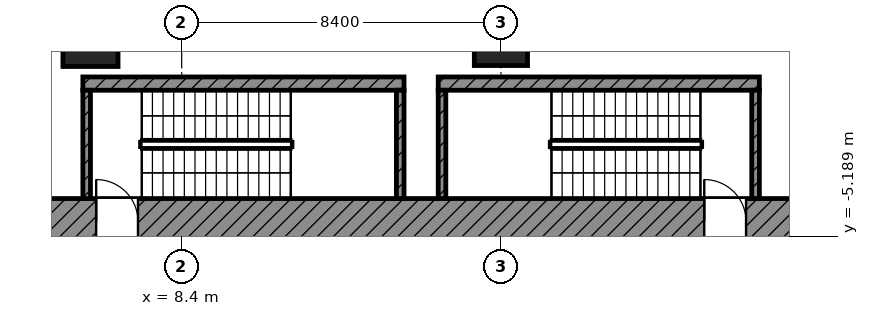
"""IFC4 building model, lengths in metres.
Left out: names, types, materials, properties, quantities, classifications, styles, units other than length and angle.
Written with IfcOpenShell. Run it as: python <this file> out.ifc"""

import sys

from ifc_helpers import new_model, si_unit, direction, frame, frame_2d, origin, origin_2d, place, context, subcontext, project, spatial, rectangle, extrude, element, fill, save


model = new_model("IFC4")
c1 = context("Model", 3, precision=1e-05, world=origin(), true_north=direction((0.0, 1.0)))
c2 = subcontext(c1, "Body", "Model", "MODEL_VIEW")
j1 = project(units=[si_unit("LENGTHUNIT", "METRE"), si_unit("PLANEANGLEUNIT", "RADIAN")], contexts=[c1])
p1 = place(None, origin())
s1 = spatial("IfcSite", under=j1, at=p1, CompositionType="ELEMENT")
p2 = place(p1, origin())
s2 = spatial("IfcBuilding", under=s1, at=p2, CompositionType="ELEMENT")
p3 = place(p2, frame((0.0, 0.0, 23.8)))
s3 = spatial("IfcBuildingStorey", under=s2, at=p3, CompositionType="ELEMENT", Elevation=23.8)
p4 = place(p3, frame((6.0, 0.0, 0.0), z_axis=(0.0, 0.0, 1.0), x_axis=(1.0, 0.0, 0.0)))
e1 = element("IfcColumn", 1, at=p4, inside=s3, PredefinedType="COLUMN", context=c2, shape_type="SweptSolid", body=[
    extrude(rectangle(XDim=1.45, YDim=1.45, at=origin_2d()), origin(), (0.0, 0.0, 1.0), 5.2),
])
p5 = place(p3, frame((16.8, 0.0, 0.0), z_axis=(0.0, 0.0, 1.0), x_axis=(1.0, 0.0, 0.0)))
e2 = element("IfcColumn", 2, at=p5, inside=s3, PredefinedType="COLUMN", context=c2, shape_type="SweptSolid", body=[
    extrude(rectangle(XDim=1.4, YDim=1.4, at=origin_2d()), origin(), (0.0, 0.0, 1.0), 5.2),
])
p6 = place(p3, frame((4.2, -4.8, 0.0), z_axis=(0.0, 0.0, 1.0), x_axis=(1.0, 0.0, 0.0)))
e3 = element("IfcWall", 3, at=p6, inside=s3, PredefinedType="SHEAR", context=c2, shape_type="SweptSolid", body=[
    extrude(rectangle(XDim=21.0, YDim=1.2, at=frame_2d((10.5, 0.0))), origin(), (0.0, 0.0, 1.0), 4.85),
])
p7 = place(p6, frame((1.95, 0.0, 0.0)))
e4 = element("IfcOpeningElement", 4, at=p7, cuts=e3, PredefinedType="OPENING", context=c2, shape_type="SweptSolid", body=[
    extrude(rectangle(XDim=1.1, YDim=2.1, at=frame_2d((0.55, 1.05))), frame((0.0, 0.61, 0.0), z_axis=(0.0, -1.0, 0.0), x_axis=(1.0, 0.0, 0.0)), (0.0, 0.0, 1.0), 1.22),
])
p8 = place(p6, frame((17.95, 0.0, 0.0)))
e5 = element("IfcOpeningElement", 5, at=p8, cuts=e3, PredefinedType="OPENING", context=c2, shape_type="SweptSolid", body=[
    extrude(rectangle(XDim=1.1, YDim=2.1, at=frame_2d((0.55, 1.05))), frame((0.0, 0.61, 0.0), z_axis=(0.0, -1.0, 0.0), x_axis=(1.0, 0.0, 0.0)), (0.0, 0.0, 1.0), 1.22),
])
p9 = place(p3, frame((5.8, -1.175, 0.0), z_axis=(0.0, 0.0, 1.0), x_axis=(1.0, 0.0, 0.0)))
e6 = element("IfcWall", 6, at=p9, inside=s3, PredefinedType="SHEAR", context=c2, shape_type="SweptSolid", body=[
    extrude(rectangle(XDim=8.45, YDim=0.35, at=frame_2d((4.225, 0.0))), origin(), (0.0, 0.0, 1.0), 4.85),
])
for number, where, z_axis, x_axis in (
    (7, (5.9, -4.2, 0.0), (0.0, 0.0, 1.0), (0.0, 1.0, 0.0)),
    (8, (14.15, -4.2, 0.0), (0.0, 0.0, 1.0), (0.0, 1.0, 0.0)),
):
    element("IfcWall", number, at=place(p3, frame(where, z_axis=z_axis, x_axis=x_axis)), inside=s3, PredefinedType="SHEAR", context=c2, shape_type="SweptSolid", body=[
        extrude(rectangle(XDim=2.85, YDim=0.2, at=frame_2d((1.425, 0.0))), origin(), (0.0, 0.0, 1.0), 4.85),
    ])
p10 = place(p3, frame((15.15, -1.175, 0.0), z_axis=(0.0, 0.0, 1.0), x_axis=(1.0, 0.0, 0.0)))
e9 = element("IfcWall", 9, at=p10, inside=s3, PredefinedType="SHEAR", context=c2, shape_type="SweptSolid", body=[
    extrude(rectangle(XDim=8.45, YDim=0.35, at=frame_2d((4.225, 0.0))), origin(), (0.0, 0.0, 1.0), 4.85),
])
for number, where, z_axis, x_axis in (
    (10, (15.25, -4.2, 0.0), (0.0, 0.0, 1.0), (0.0, 1.0, 0.0)),
    (11, (23.5, -4.2, 0.0), (0.0, 0.0, 1.0), (0.0, 1.0, 0.0)),
):
    element("IfcWall", number, at=place(p3, frame(where, z_axis=z_axis, x_axis=x_axis)), inside=s3, PredefinedType="SHEAR", context=c2, shape_type="SweptSolid", body=[
        extrude(rectangle(XDim=2.85, YDim=0.2, at=frame_2d((1.425, 0.0))), origin(), (0.0, 0.0, 1.0), 4.85),
    ])
p11 = place(p7, origin())
e12 = element("IfcDoor", 12, at=p11, inside=s3, OperationType="SINGLE_SWING_LEFT", PredefinedType="DOOR", context=c2, shape_type="SweptSolid", body=[
    extrude(rectangle(XDim=1.1, YDim=2.1, at=frame_2d((0.55, 1.05))), frame((0.0, 0.025, 0.0), z_axis=(0.0, -1.0, 0.0), x_axis=(1.0, 0.0, 0.0)), (0.0, 0.0, 1.0), 0.05),
])
fill(e4, e12)
p12 = place(p8, origin())
e13 = element("IfcDoor", 13, at=p12, inside=s3, OperationType="SINGLE_SWING_LEFT", PredefinedType="DOOR", context=c2, shape_type="SweptSolid", body=[
    extrude(rectangle(XDim=1.1, YDim=2.1, at=frame_2d((0.55, 1.05))), frame((0.0, 0.025, 0.0), z_axis=(0.0, -1.0, 0.0), x_axis=(1.0, 0.0, 0.0)), (0.0, 0.0, 1.0), 0.05),
])
fill(e5, e13)
save(model, sys.argv[1])
